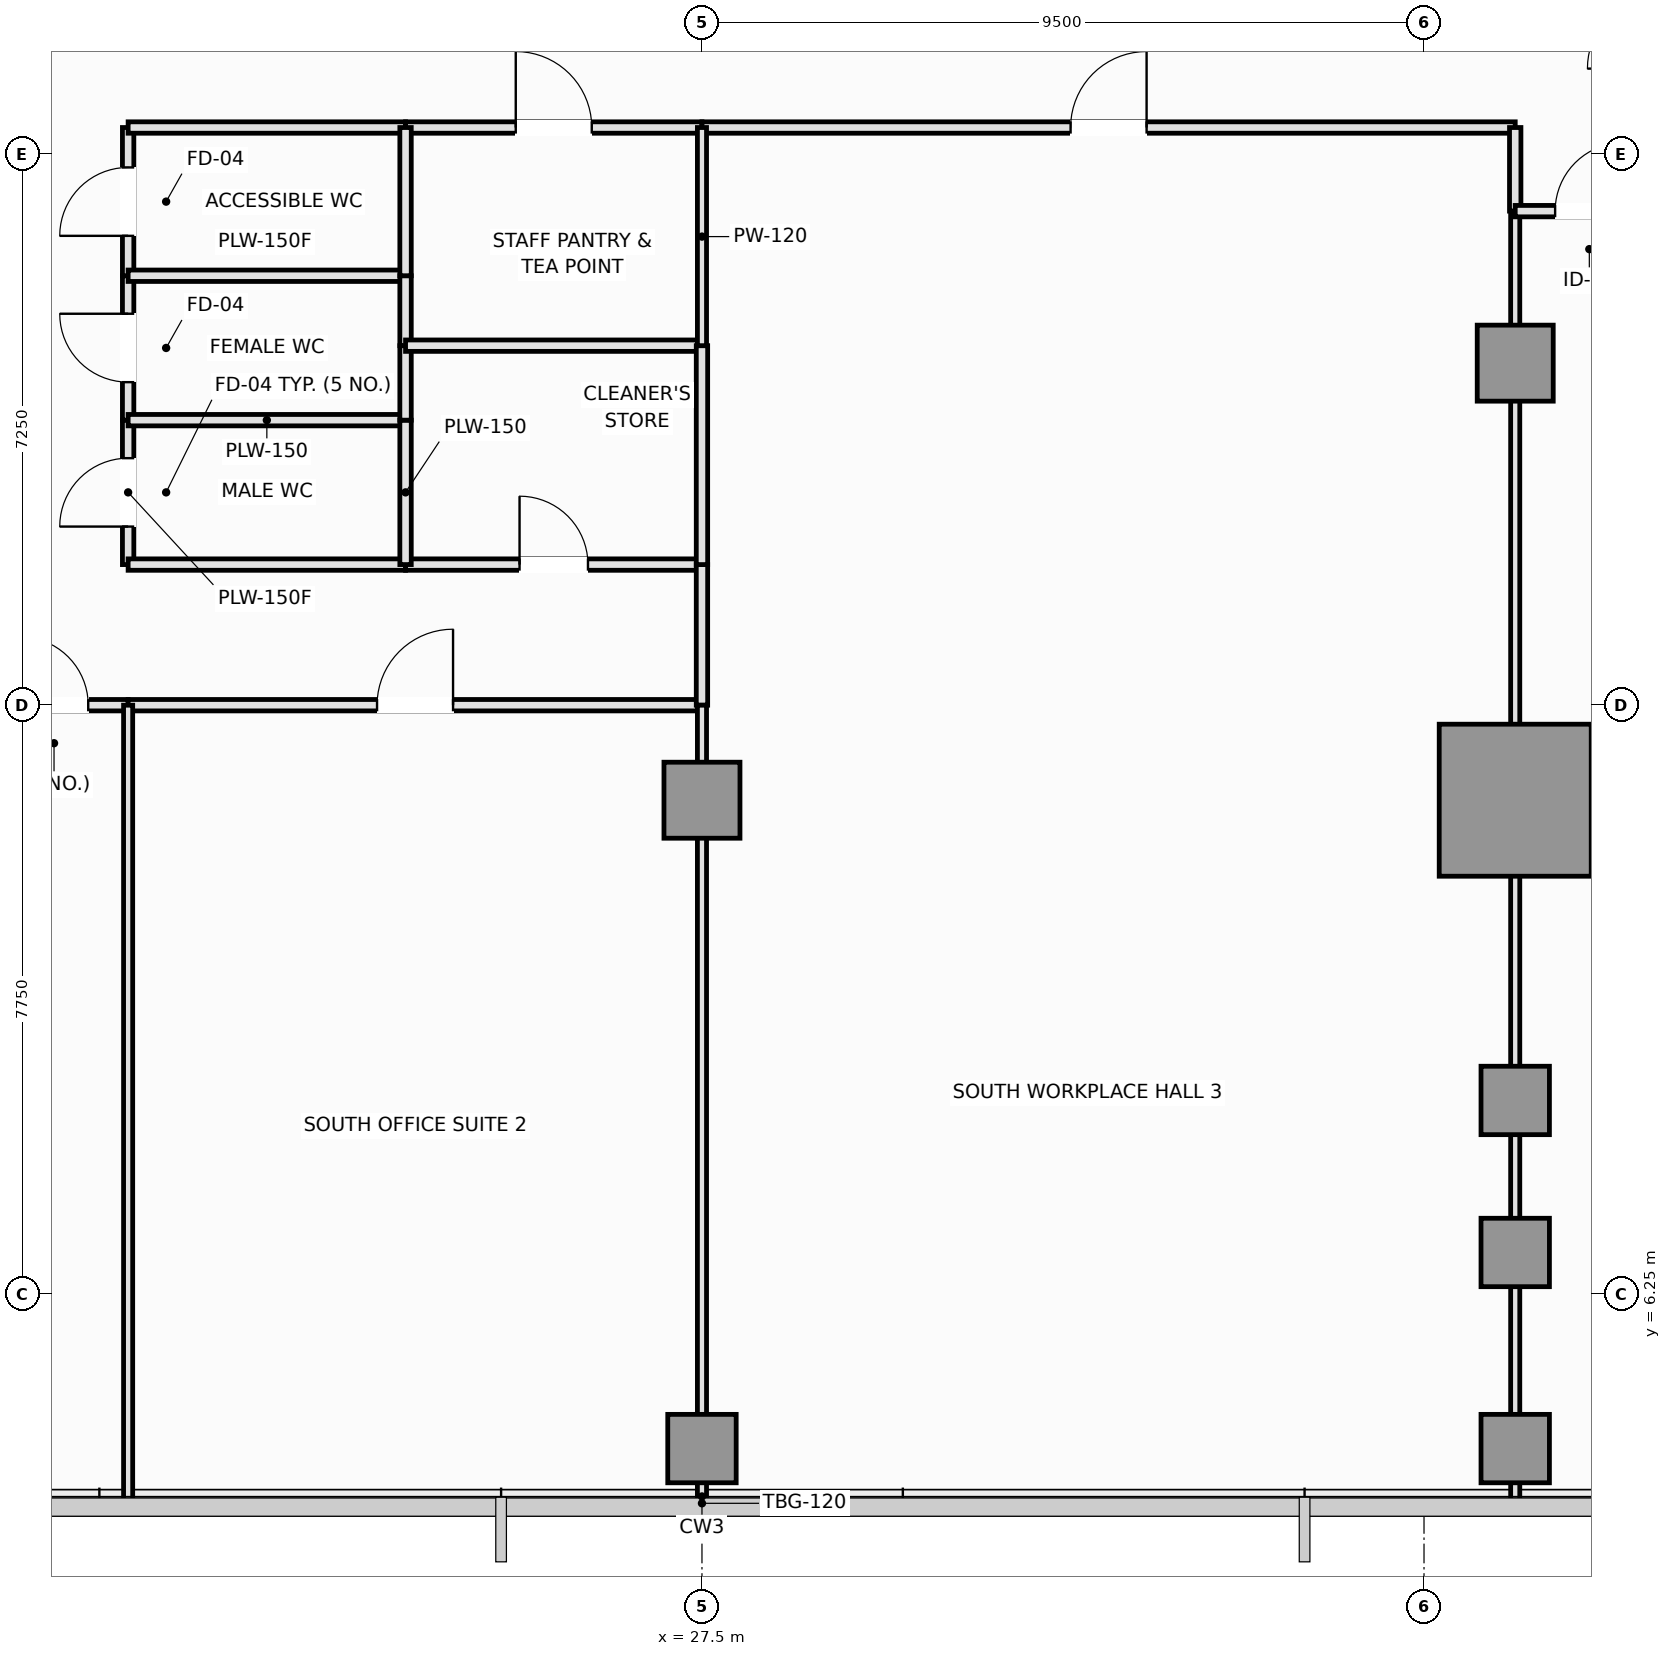
"""IFC4 building model, lengths in metres.
Left out: names, types, materials, properties, quantities, classifications, styles, units other than length and angle.
Written with IfcOpenShell. Run it as: python <this file> out.ifc"""

import sys

from ifc_helpers import new_model, si_unit, direction, frame, frame_2d, origin, origin_2d, place, context, subcontext, project, spatial, rectangle, extrude, element, fill, save


model = new_model("IFC4")
c1 = context("Model", 3, precision=1e-05, world=origin(), true_north=direction((0.0, 1.0)))
c2 = subcontext(c1, "Body", "Model", "MODEL_VIEW")
j1 = project(units=[si_unit("LENGTHUNIT", "METRE"), si_unit("PLANEANGLEUNIT", "RADIAN")], contexts=[c1])
p1 = place(None, origin())
s1 = spatial("IfcSite", under=j1, at=p1, CompositionType="ELEMENT")
p2 = place(p1, origin())
s2 = spatial("IfcBuilding", under=s1, at=p2, CompositionType="ELEMENT")
p3 = place(p2, frame((0.0, 0.0, 166.15)))
s3 = spatial("IfcBuildingStorey", under=s2, at=p3, CompositionType="ELEMENT", Elevation=166.15)
p4 = place(p3, frame((38.2, 12.75, 0.0), z_axis=(0.0, 0.0, 1.0), x_axis=(1.0, 0.0, 0.0)))
e1 = element("IfcColumn", 1, at=p4, inside=s3, PredefinedType="COLUMN", context=c2, shape_type="SweptSolid", body=[
    extrude(rectangle(XDim=2.0, YDim=2.0, at=origin_2d()), origin(), (0.0, 0.0, 1.0), 3.55),
])
for number, where, z_axis, x_axis in (
    (2, (27.5, 12.75, 0.0), (0.0, 0.0, 1.0), (1.0, 0.0, 0.0)),
    (3, (38.2, 18.5, 0.0), (0.0, 0.0, 1.0), (1.0, 0.0, 0.0)),
):
    element("IfcColumn", number, at=place(p3, frame(where, z_axis=z_axis, x_axis=x_axis)), inside=s3, PredefinedType="COLUMN", context=c2, shape_type="SweptSolid", body=[
        extrude(rectangle(XDim=1.0, YDim=1.0, at=origin_2d()), origin(), (0.0, 0.0, 1.0), 3.55),
    ])
for number, where, z_axis, x_axis in (
    (4, (38.2, 6.8, 0.0), (0.0, 0.0, 1.0), (1.0, 0.0, 0.0)),
    (5, (38.2, 8.8, 0.0), (0.0, 0.0, 1.0), (1.0, 0.0, 0.0)),
    (6, (27.5, 4.22, 0.0), (0.0, 0.0, 1.0), (1.0, 0.0, 0.0)),
    (7, (38.2, 4.22, 0.0), (0.0, 0.0, 1.0), (1.0, 0.0, 0.0)),
):
    element("IfcColumn", number, at=place(p3, frame(where, z_axis=z_axis, x_axis=x_axis)), inside=s3, PredefinedType="COLUMN", context=c2, shape_type="SweptSolid", body=[
        extrude(rectangle(XDim=0.9, YDim=0.9, at=origin_2d()), origin(), (0.0, 0.0, 1.0), 3.55),
    ])
p5 = place(p3, frame((19.95, 15.85, 0.0), z_axis=(0.0, 0.0, 1.0), x_axis=(0.0, 1.0, 0.0)))
e8 = element("IfcWall", 8, at=p5, inside=s3, PredefinedType="PLUMBINGWALL", context=c2, shape_type="SweptSolid", body=[
    extrude(rectangle(XDim=1.9, YDim=0.15, at=frame_2d((0.95, 0.0))), origin(), (0.0, 0.0, 1.0), 3.37),
])
p6 = place(p5, frame((0.5, 0.0, 0.0)))
e9 = element("IfcOpeningElement", 9, at=p6, cuts=e8, PredefinedType="OPENING", context=c2, shape_type="SweptSolid", body=[
    extrude(rectangle(XDim=0.9, YDim=2.1, at=frame_2d((0.45, 1.05))), frame((0.0, 0.085, 0.0), z_axis=(0.0, -1.0, 0.0), x_axis=(1.0, 0.0, 0.0)), (0.0, 0.0, 1.0), 0.17),
])
p7 = place(p3, frame((19.95, 17.75, 0.0), z_axis=(0.0, 0.0, 1.0), x_axis=(0.0, 1.0, 0.0)))
e10 = element("IfcWall", 10, at=p7, inside=s3, PredefinedType="PLUMBINGWALL", context=c2, shape_type="SweptSolid", body=[
    extrude(rectangle(XDim=1.9, YDim=0.15, at=frame_2d((0.95, 0.0))), origin(), (0.0, 0.0, 1.0), 3.37),
])
p8 = place(p7, frame((0.5, 0.0, 0.0)))
e11 = element("IfcOpeningElement", 11, at=p8, cuts=e10, PredefinedType="OPENING", context=c2, shape_type="SweptSolid", body=[
    extrude(rectangle(XDim=0.9, YDim=2.1, at=frame_2d((0.45, 1.05))), frame((0.0, 0.085, 0.0), z_axis=(0.0, -1.0, 0.0), x_axis=(1.0, 0.0, 0.0)), (0.0, 0.0, 1.0), 0.17),
])
p9 = place(p3, frame((19.95, 19.65, 0.0), z_axis=(0.0, 0.0, 1.0), x_axis=(0.0, 1.0, 0.0)))
e12 = element("IfcWall", 12, at=p9, inside=s3, PredefinedType="PLUMBINGWALL", context=c2, shape_type="SweptSolid", body=[
    extrude(rectangle(XDim=1.95, YDim=0.15, at=frame_2d((0.975, 0.0))), origin(), (0.0, 0.0, 1.0), 3.37),
])
p10 = place(p9, frame((0.525, 0.0, 0.0)))
e13 = element("IfcOpeningElement", 13, at=p10, cuts=e12, PredefinedType="OPENING", context=c2, shape_type="SweptSolid", body=[
    extrude(rectangle(XDim=0.9, YDim=2.1, at=frame_2d((0.45, 1.05))), frame((0.0, 0.085, 0.0), z_axis=(0.0, -1.0, 0.0), x_axis=(1.0, 0.0, 0.0)), (0.0, 0.0, 1.0), 0.17),
])
p11 = place(p3, frame((18.0, 14.0, 0.0), z_axis=(0.0, 0.0, 1.0), x_axis=(1.0, 0.0, 0.0)))
e14 = element("IfcWall", 14, at=p11, inside=s3, PredefinedType="PARTITIONING", context=c2, shape_type="SweptSolid", body=[
    extrude(rectangle(XDim=1.95, YDim=0.15, at=frame_2d((0.975, 0.0))), origin(), (0.0, 0.0, 1.0), 3.37),
])
p12 = place(p11, frame((0.525, 0.0, 0.0)))
e15 = element("IfcOpeningElement", 15, at=p12, cuts=e14, PredefinedType="OPENING", context=c2, shape_type="SweptSolid", body=[
    extrude(rectangle(XDim=0.9, YDim=2.1, at=frame_2d((0.45, 1.05))), frame((0.0, 0.085, 0.0), z_axis=(0.0, -1.0, 0.0), x_axis=(1.0, 0.0, 0.0)), (0.0, 0.0, 1.0), 0.17),
])
p13 = place(p3, frame((19.95, 21.6, 0.0), z_axis=(0.0, 0.0, 1.0), x_axis=(1.0, 0.0, 0.0)))
e16 = element("IfcWall", 16, at=p13, inside=s3, PredefinedType="PLUMBINGWALL", context=c2, shape_type="SweptSolid", body=[
    extrude(rectangle(XDim=3.65, YDim=0.15, at=frame_2d((1.825, 0.0))), origin(), (0.0, 0.0, 1.0), 3.37),
])
p14 = place(p3, frame((23.6, 21.6, 0.0), z_axis=(0.0, 0.0, 1.0), x_axis=(1.0, 0.0, 0.0)))
e17 = element("IfcWall", 17, at=p14, inside=s3, PredefinedType="PARTITIONING", context=c2, shape_type="SweptSolid", body=[
    extrude(rectangle(XDim=3.9, YDim=0.15, at=frame_2d((1.95, 0.0))), origin(), (0.0, 0.0, 1.0), 3.37),
])
p15 = place(p14, frame((1.45, 0.0, 0.0)))
e18 = element("IfcOpeningElement", 18, at=p15, cuts=e17, PredefinedType="OPENING", context=c2, shape_type="SweptSolid", body=[
    extrude(rectangle(XDim=1.0, YDim=2.15, at=frame_2d((0.5, 1.075))), frame((0.0, 0.085, 0.0), z_axis=(0.0, -1.0, 0.0), x_axis=(1.0, 0.0, 0.0)), (0.0, 0.0, 1.0), 0.17),
])
p16 = place(p3, frame((27.5, 21.6, 0.0), z_axis=(0.0, 0.0, 1.0), x_axis=(1.0, 0.0, 0.0)))
e19 = element("IfcWall", 19, at=p16, inside=s3, PredefinedType="PARTITIONING", context=c2, shape_type="SweptSolid", body=[
    extrude(rectangle(XDim=10.7, YDim=0.15, at=frame_2d((5.35, 0.0))), origin(), (0.0, 0.0, 1.0), 3.37),
])
p17 = place(p16, frame((4.85, 0.0, 0.0)))
e20 = element("IfcOpeningElement", 20, at=p17, cuts=e19, PredefinedType="OPENING", context=c2, shape_type="SweptSolid", body=[
    extrude(rectangle(XDim=1.0, YDim=2.15, at=frame_2d((0.5, 1.075))), frame((0.0, 0.085, 0.0), z_axis=(0.0, -1.0, 0.0), x_axis=(1.0, 0.0, 0.0)), (0.0, 0.0, 1.0), 0.17),
])
p18 = place(p3, frame((19.95, 15.85, 0.0), z_axis=(0.0, 0.0, 1.0), x_axis=(1.0, 0.0, 0.0)))
e21 = element("IfcWall", 21, at=p18, inside=s3, PredefinedType="PLUMBINGWALL", context=c2, shape_type="SweptSolid", body=[
    extrude(rectangle(XDim=3.65, YDim=0.15, at=frame_2d((1.825, 0.0))), origin(), (0.0, 0.0, 1.0), 3.37),
])
p19 = place(p3, frame((23.6, 15.85, 0.0), z_axis=(0.0, 0.0, 1.0), x_axis=(1.0, 0.0, 0.0)))
e22 = element("IfcWall", 22, at=p19, inside=s3, PredefinedType="PLUMBINGWALL", context=c2, shape_type="SweptSolid", body=[
    extrude(rectangle(XDim=3.9, YDim=0.15, at=frame_2d((1.95, 0.0))), origin(), (0.0, 0.0, 1.0), 3.37),
])
p20 = place(p19, frame((1.5, 0.0, 0.0)))
e23 = element("IfcOpeningElement", 23, at=p20, cuts=e22, PredefinedType="OPENING", context=c2, shape_type="SweptSolid", body=[
    extrude(rectangle(XDim=0.9, YDim=2.1, at=frame_2d((0.45, 1.05))), frame((0.0, 0.085, 0.0), z_axis=(0.0, -1.0, 0.0), x_axis=(1.0, 0.0, 0.0)), (0.0, 0.0, 1.0), 0.17),
])
p21 = place(p3, frame((19.95, 14.0, 0.0), z_axis=(0.0, 0.0, 1.0), x_axis=(1.0, 0.0, 0.0)))
e24 = element("IfcWall", 24, at=p21, inside=s3, PredefinedType="PARTITIONING", context=c2, shape_type="SweptSolid", body=[
    extrude(rectangle(XDim=7.55, YDim=0.15, at=frame_2d((3.775, 0.0))), origin(), (0.0, 0.0, 1.0), 3.37),
])
p22 = place(p21, frame((3.275, 0.0, 0.0)))
e25 = element("IfcOpeningElement", 25, at=p22, cuts=e24, PredefinedType="OPENING", context=c2, shape_type="SweptSolid", body=[
    extrude(rectangle(XDim=1.0, YDim=2.15, at=frame_2d((0.5, 1.075))), frame((0.0, 0.085, 0.0), z_axis=(0.0, -1.0, 0.0), x_axis=(1.0, 0.0, 0.0)), (0.0, 0.0, 1.0), 0.17),
])
p23 = place(p3, frame((27.5, 14.0, 0.0), z_axis=(0.0, 0.0, 1.0), x_axis=(0.0, 1.0, 0.0)))
e26 = element("IfcWall", 26, at=p23, inside=s3, PredefinedType="PARTITIONING", context=c2, shape_type="SweptSolid", body=[
    extrude(rectangle(XDim=1.85, YDim=0.15, at=frame_2d((0.925, 0.0))), origin(), (0.0, 0.0, 1.0), 3.37),
])
p24 = place(p3, frame((19.95, 17.75, 0.0), z_axis=(0.0, 0.0, 1.0), x_axis=(1.0, 0.0, 0.0)))
e27 = element("IfcWall", 27, at=p24, inside=s3, PredefinedType="PLUMBINGWALL", context=c2, shape_type="SweptSolid", body=[
    extrude(rectangle(XDim=3.65, YDim=0.15, at=frame_2d((1.825, 0.0))), origin(), (0.0, 0.0, 1.0), 3.37),
])
p25 = place(p3, frame((23.6, 15.85, 0.0), z_axis=(0.0, 0.0, 1.0), x_axis=(0.0, 1.0, 0.0)))
e28 = element("IfcWall", 28, at=p25, inside=s3, PredefinedType="PLUMBINGWALL", context=c2, shape_type="SweptSolid", body=[
    extrude(rectangle(XDim=1.9, YDim=0.15, at=frame_2d((0.95, 0.0))), origin(), (0.0, 0.0, 1.0), 3.37),
])
p26 = place(p3, frame((19.95, 19.65, 0.0), z_axis=(0.0, 0.0, 1.0), x_axis=(1.0, 0.0, 0.0)))
e29 = element("IfcWall", 29, at=p26, inside=s3, PredefinedType="PLUMBINGWALL", context=c2, shape_type="SweptSolid", body=[
    extrude(rectangle(XDim=3.65, YDim=0.15, at=frame_2d((1.825, 0.0))), origin(), (0.0, 0.0, 1.0), 3.37),
])
p27 = place(p3, frame((23.6, 17.75, 0.0), z_axis=(0.0, 0.0, 1.0), x_axis=(0.0, 1.0, 0.0)))
e30 = element("IfcWall", 30, at=p27, inside=s3, PredefinedType="PLUMBINGWALL", context=c2, shape_type="SweptSolid", body=[
    extrude(rectangle(XDim=0.98, YDim=0.15, at=frame_2d((0.49, 0.0))), origin(), (0.0, 0.0, 1.0), 3.37),
])
p28 = place(p3, frame((23.6, 18.73, 0.0), z_axis=(0.0, 0.0, 1.0), x_axis=(0.0, 1.0, 0.0)))
e31 = element("IfcWall", 31, at=p28, inside=s3, PredefinedType="PLUMBINGWALL", context=c2, shape_type="SweptSolid", body=[
    extrude(rectangle(XDim=0.92, YDim=0.15, at=frame_2d((0.46, 0.0))), origin(), (0.0, 0.0, 1.0), 3.37),
])
p29 = place(p3, frame((23.6, 19.65, 0.0), z_axis=(0.0, 0.0, 1.0), x_axis=(0.0, 1.0, 0.0)))
e32 = element("IfcWall", 32, at=p29, inside=s3, PredefinedType="PLUMBINGWALL", context=c2, shape_type="SweptSolid", body=[
    extrude(rectangle(XDim=1.95, YDim=0.15, at=frame_2d((0.975, 0.0))), origin(), (0.0, 0.0, 1.0), 3.37),
])
p30 = place(p3, frame((23.6, 18.73, 0.0), z_axis=(0.0, 0.0, 1.0), x_axis=(1.0, 0.0, 0.0)))
e33 = element("IfcWall", 33, at=p30, inside=s3, PredefinedType="PLUMBINGWALL", context=c2, shape_type="SweptSolid", body=[
    extrude(rectangle(XDim=3.9, YDim=0.15, at=frame_2d((1.95, 0.0))), origin(), (0.0, 0.0, 1.0), 3.37),
])
p31 = place(p3, frame((27.5, 15.85, 0.0), z_axis=(0.0, 0.0, 1.0), x_axis=(0.0, 1.0, 0.0)))
e34 = element("IfcWall", 34, at=p31, inside=s3, PredefinedType="PLUMBINGWALL", context=c2, shape_type="SweptSolid", body=[
    extrude(rectangle(XDim=2.88, YDim=0.15, at=frame_2d((1.44, 0.0))), origin(), (0.0, 0.0, 1.0), 3.37),
])
p32 = place(p3, frame((27.5, 18.73, 0.0), z_axis=(0.0, 0.0, 1.0), x_axis=(0.0, 1.0, 0.0)))
e35 = element("IfcWall", 35, at=p32, inside=s3, PredefinedType="PARTITIONING", context=c2, shape_type="SweptSolid", body=[
    extrude(rectangle(XDim=2.87, YDim=0.12, at=frame_2d((1.435, 0.0))), origin(), (0.0, 0.0, 1.0), 3.37),
])
p33 = place(p3, frame((19.95, 3.51, 0.0), z_axis=(0.0, 0.0, 1.0), x_axis=(0.0, 1.0, 0.0)))
e36 = element("IfcWall", 36, at=p33, inside=s3, PredefinedType="PARTITIONING", context=c2, shape_type="SweptSolid", body=[
    extrude(rectangle(XDim=10.49, YDim=0.12, at=frame_2d((5.245, 0.0))), origin(), (0.0, 0.0, 1.0), 3.37),
])
p34 = place(p3, frame((27.5, 3.51, 0.0), z_axis=(0.0, 0.0, 1.0), x_axis=(0.0, 1.0, 0.0)))
e37 = element("IfcWall", 37, at=p34, inside=s3, PredefinedType="PARTITIONING", context=c2, shape_type="SweptSolid", body=[
    extrude(rectangle(XDim=10.49, YDim=0.12, at=frame_2d((5.245, 0.0))), origin(), (0.0, 0.0, 1.0), 2.87),
])
p35 = place(p3, frame((38.2, 20.5, 0.0), z_axis=(0.0, 0.0, 1.0), x_axis=(0.0, 1.0, 0.0)))
e38 = element("IfcWall", 38, at=p35, inside=s3, PredefinedType="PARTITIONING", context=c2, shape_type="SweptSolid", body=[
    extrude(rectangle(XDim=1.1, YDim=0.15, at=frame_2d((0.55, 0.0))), origin(), (0.0, 0.0, 1.0), 2.87),
])
p36 = place(p3, frame((38.2, 3.51, 0.0), z_axis=(0.0, 0.0, 1.0), x_axis=(0.0, 1.0, 0.0)))
e39 = element("IfcWall", 39, at=p36, inside=s3, PredefinedType="PARTITIONING", context=c2, shape_type="SweptSolid", body=[
    extrude(rectangle(XDim=16.99, YDim=0.12, at=frame_2d((8.495, 0.0))), origin(), (0.0, 0.0, 1.0), 2.87),
])
p37 = place(p3, frame((38.2, 20.5, 0.0), z_axis=(0.0, 0.0, 1.0), x_axis=(1.0, 0.0, 0.0)))
e40 = element("IfcWall", 40, at=p37, inside=s3, PredefinedType="PARTITIONING", context=c2, shape_type="SweptSolid", body=[
    extrude(rectangle(XDim=1.95, YDim=0.15, at=frame_2d((0.975, 0.0))), origin(), (0.0, 0.0, 1.0), 3.37),
])
p38 = place(p37, frame((0.525, 0.0, 0.0)))
e41 = element("IfcOpeningElement", 41, at=p38, cuts=e40, PredefinedType="OPENING", context=c2, shape_type="SweptSolid", body=[
    extrude(rectangle(XDim=0.9, YDim=2.1, at=frame_2d((0.45, 1.05))), frame((0.0, 0.085, 0.0), z_axis=(0.0, -1.0, 0.0), x_axis=(1.0, 0.0, 0.0)), (0.0, 0.0, 1.0), 0.17),
])
p39 = place(p6, origin())
e42 = element("IfcDoor", 42, at=p39, inside=s3, OperationType="SINGLE_SWING_LEFT", PredefinedType="DOOR", context=c2, shape_type="SweptSolid", body=[
    extrude(rectangle(XDim=0.9, YDim=2.1, at=frame_2d((0.45, 1.05))), frame((0.0, 0.025, 0.0), z_axis=(0.0, -1.0, 0.0), x_axis=(1.0, 0.0, 0.0)), (0.0, 0.0, 1.0), 0.05),
])
fill(e9, e42)
p40 = place(p8, origin())
e43 = element("IfcDoor", 43, at=p40, inside=s3, OperationType="SINGLE_SWING_RIGHT", PredefinedType="DOOR", context=c2, shape_type="SweptSolid", body=[
    extrude(rectangle(XDim=0.9, YDim=2.1, at=frame_2d((0.45, 1.05))), frame((0.0, 0.025, 0.0), z_axis=(0.0, -1.0, 0.0), x_axis=(1.0, 0.0, 0.0)), (0.0, 0.0, 1.0), 0.05),
])
fill(e11, e43)
p41 = place(p10, origin())
e44 = element("IfcDoor", 44, at=p41, inside=s3, OperationType="SINGLE_SWING_LEFT", PredefinedType="DOOR", context=c2, shape_type="SweptSolid", body=[
    extrude(rectangle(XDim=0.9, YDim=2.1, at=frame_2d((0.45, 1.05))), frame((0.0, 0.025, 0.0), z_axis=(0.0, -1.0, 0.0), x_axis=(1.0, 0.0, 0.0)), (0.0, 0.0, 1.0), 0.05),
])
fill(e13, e44)
p42 = place(p12, origin())
e45 = element("IfcDoor", 45, at=p42, inside=s3, OperationType="SINGLE_SWING_LEFT", PredefinedType="DOOR", context=c2, shape_type="SweptSolid", body=[
    extrude(rectangle(XDim=0.9, YDim=2.1, at=frame_2d((0.45, 1.05))), frame((0.0, 0.025, 0.0), z_axis=(0.0, -1.0, 0.0), x_axis=(1.0, 0.0, 0.0)), (0.0, 0.0, 1.0), 0.05),
])
fill(e15, e45)
p43 = place(p15, origin())
e46 = element("IfcDoor", 46, at=p43, inside=s3, OperationType="SINGLE_SWING_LEFT", PredefinedType="DOOR", context=c2, shape_type="SweptSolid", body=[
    extrude(rectangle(XDim=1.0, YDim=2.15, at=frame_2d((0.5, 1.075))), frame((0.0, 0.025, 0.0), z_axis=(0.0, -1.0, 0.0), x_axis=(1.0, 0.0, 0.0)), (0.0, 0.0, 1.0), 0.05),
])
fill(e18, e46)
p44 = place(p17, origin())
e47 = element("IfcDoor", 47, at=p44, inside=s3, OperationType="SINGLE_SWING_RIGHT", PredefinedType="DOOR", context=c2, shape_type="SweptSolid", body=[
    extrude(rectangle(XDim=1.0, YDim=2.15, at=frame_2d((0.5, 1.075))), frame((0.0, 0.025, 0.0), z_axis=(0.0, -1.0, 0.0), x_axis=(1.0, 0.0, 0.0)), (0.0, 0.0, 1.0), 0.05),
])
fill(e20, e47)
p45 = place(p20, origin())
e48 = element("IfcDoor", 48, at=p45, inside=s3, OperationType="SINGLE_SWING_LEFT", PredefinedType="DOOR", context=c2, shape_type="SweptSolid", body=[
    extrude(rectangle(XDim=0.9, YDim=2.1, at=frame_2d((0.45, 1.05))), frame((0.0, 0.025, 0.0), z_axis=(0.0, -1.0, 0.0), x_axis=(1.0, 0.0, 0.0)), (0.0, 0.0, 1.0), 0.05),
])
fill(e23, e48)
p46 = place(p22, origin())
e49 = element("IfcDoor", 49, at=p46, inside=s3, OperationType="SINGLE_SWING_RIGHT", PredefinedType="DOOR", context=c2, shape_type="SweptSolid", body=[
    extrude(rectangle(XDim=1.0, YDim=2.15, at=frame_2d((0.5, 1.075))), frame((0.0, 0.025, 0.0), z_axis=(0.0, -1.0, 0.0), x_axis=(1.0, 0.0, 0.0)), (0.0, 0.0, 1.0), 0.05),
])
fill(e25, e49)
p47 = place(p38, origin())
e50 = element("IfcDoor", 50, at=p47, inside=s3, OperationType="SINGLE_SWING_RIGHT", PredefinedType="DOOR", context=c2, shape_type="SweptSolid", body=[
    extrude(rectangle(XDim=0.9, YDim=2.1, at=frame_2d((0.45, 1.05))), frame((0.0, 0.025, 0.0), z_axis=(0.0, -1.0, 0.0), x_axis=(1.0, 0.0, 0.0)), (0.0, 0.0, 1.0), 0.05),
])
fill(e41, e50)
save(model, sys.argv[1])
